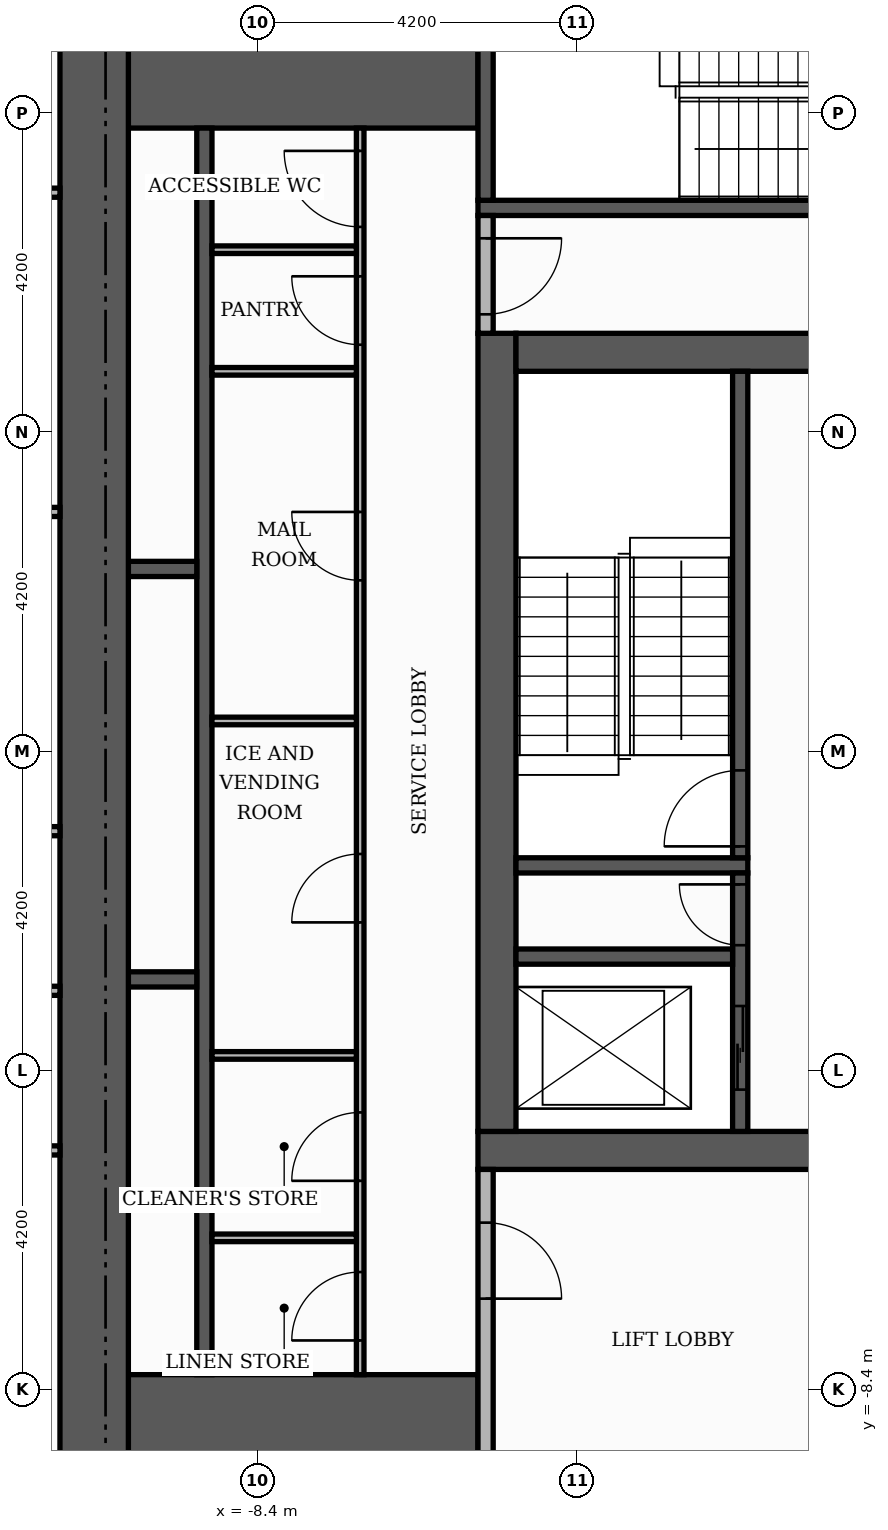
"""IFC4 building model, lengths in metres.
Left out: names, types, materials, properties, quantities, classifications, styles, units other than length and angle.
Written with IfcOpenShell. Run it as: python <this file> out.ifc"""

import sys

from ifc_helpers import new_model, si_unit, direction, frame, frame_2d, origin, place, context, subcontext, project, spatial, rectangle, extrude, element, fill, save


model = new_model("IFC4")
c1 = context("Model", 3, precision=1e-05, world=origin(), true_north=direction((0.0, 1.0)))
c2 = subcontext(c1, "Body", "Model", "MODEL_VIEW")
j1 = project(units=[si_unit("LENGTHUNIT", "METRE"), si_unit("PLANEANGLEUNIT", "RADIAN")], contexts=[c1])
p1 = place(None, origin())
s1 = spatial("IfcSite", under=j1, at=p1, CompositionType="ELEMENT")
p2 = place(p1, origin())
s2 = spatial("IfcBuilding", under=s1, at=p2, CompositionType="ELEMENT")
p3 = place(p2, frame((0.0, 0.0, 275.7)))
s3 = spatial("IfcBuildingStorey", under=s2, at=p3, CompositionType="ELEMENT", Elevation=275.7)
p4 = place(p3, frame((-5.5, -5.25, 0.0), z_axis=(0.0, 0.0, 1.0), x_axis=(1.0, 0.0, 0.0)))
e1 = element("IfcWall", 1, at=p4, inside=s3, PredefinedType="SHEAR", context=c2, shape_type="SweptSolid", body=[
    extrude(rectangle(XDim=11.0, YDim=0.5, at=frame_2d((5.5, 0.0))), origin(), (0.0, 0.0, 1.0), 3.48),
])
p5 = place(p4, frame((4.9, 0.0, 0.0)))
e2 = element("IfcOpeningElement", 2, at=p5, cuts=e1, PredefinedType="OPENING", context=c2, shape_type="SweptSolid", body=[
    extrude(rectangle(XDim=1.2, YDim=2.1, at=frame_2d((0.6, 1.05))), frame((0.0, 0.26, 0.0), z_axis=(0.0, -1.0, 0.0), x_axis=(1.0, 0.0, 0.0)), (0.0, 0.0, 1.0), 0.52),
])
p6 = place(p3, frame((-5.25, -5.0, 0.0), z_axis=(0.0, 0.0, 1.0), x_axis=(0.0, 1.0, 0.0)))
e3 = element("IfcWall", 3, at=p6, inside=s3, PredefinedType="SHEAR", context=c2, shape_type="SweptSolid", body=[
    extrude(rectangle(XDim=10.5, YDim=0.5, at=frame_2d((5.25, 0.0))), origin(), (0.0, 0.0, 1.0), 3.48),
])
p7 = place(p3, frame((-5.0, 5.25, 0.0), z_axis=(0.0, 0.0, 1.0), x_axis=(1.0, 0.0, 0.0)))
e4 = element("IfcWall", 4, at=p7, inside=s3, PredefinedType="SHEAR", context=c2, shape_type="SweptSolid", body=[
    extrude(rectangle(XDim=10.0, YDim=0.5, at=frame_2d((5.0, 0.0))), origin(), (0.0, 0.0, 1.0), 3.48),
])
p8 = place(p7, frame((4.4, 0.0, 0.0)))
e5 = element("IfcOpeningElement", 5, at=p8, cuts=e4, PredefinedType="OPENING", context=c2, shape_type="SweptSolid", body=[
    extrude(rectangle(XDim=1.2, YDim=2.1, at=frame_2d((0.6, 1.05))), frame((0.0, 0.26, 0.0), z_axis=(0.0, -1.0, 0.0), x_axis=(1.0, 0.0, 0.0)), (0.0, 0.0, 1.0), 0.52),
])
for number, where, z_axis, x_axis in (
    (6, (-10.1, -9.15, 0.0), (0.0, 0.0, 1.0), (1.0, 0.0, 0.0)),
    (7, (-10.1, 9.15, 0.0), (0.0, 0.0, 1.0), (1.0, 0.0, 0.0)),
):
    element("IfcWall", number, at=place(p3, frame(where, z_axis=z_axis, x_axis=x_axis)), inside=s3, PredefinedType="SHEAR", context=c2, shape_type="SweptSolid", body=[
        extrude(rectangle(XDim=4.6, YDim=1.9, at=frame_2d((2.3, 0.0))), origin(), (0.0, 0.0, 1.0), 3.48),
    ])
p9 = place(p3, frame((-5.0, -1.5, 0.0), z_axis=(0.0, 0.0, 1.0), x_axis=(1.0, 0.0, 0.0)))
e8 = element("IfcWall", 8, at=p9, inside=s3, PredefinedType="SHEAR", context=c2, shape_type="SweptSolid", body=[
    extrude(rectangle(XDim=3.05, YDim=0.2, at=frame_2d((1.525, 0.0))), origin(), (0.0, 0.0, 1.0), 3.48),
])
p10 = place(p3, frame((-2.05, -1.4, 0.0), z_axis=(0.0, 0.0, 1.0), x_axis=(0.0, 1.0, 0.0)))
e9 = element("IfcWall", 9, at=p10, inside=s3, PredefinedType="SHEAR", context=c2, shape_type="SweptSolid", body=[
    extrude(rectangle(XDim=6.4, YDim=0.2, at=frame_2d((3.2, 0.0))), origin(), (0.0, 0.0, 1.0), 3.48),
])
p11 = place(p10, frame((0.15, 0.0, 0.0)))
e10 = element("IfcOpeningElement", 10, at=p11, cuts=e9, PredefinedType="OPENING", context=c2, shape_type="SweptSolid", body=[
    extrude(rectangle(XDim=1.0, YDim=2.1, at=frame_2d((0.5, 1.05))), frame((0.0, 0.11, 0.0), z_axis=(0.0, -1.0, 0.0), x_axis=(1.0, 0.0, 0.0)), (0.0, 0.0, 1.0), 0.22),
])
p12 = place(p3, frame((-5.5, 7.15, 0.0), z_axis=(0.0, 0.0, 1.0), x_axis=(1.0, 0.0, 0.0)))
e11 = element("IfcWall", 11, at=p12, inside=s3, PredefinedType="SHEAR", context=c2, shape_type="SweptSolid", body=[
    extrude(rectangle(XDim=6.8, YDim=0.2, at=frame_2d((3.4, 0.0))), origin(), (0.0, 0.0, 1.0), 3.48),
])
p13 = place(p3, frame((-5.4, 7.25, 0.0), z_axis=(0.0, 0.0, 1.0), x_axis=(0.0, 1.0, 0.0)))
e12 = element("IfcWall", 12, at=p13, inside=s3, PredefinedType="SHEAR", context=c2, shape_type="SweptSolid", body=[
    extrude(rectangle(XDim=2.85, YDim=0.2, at=frame_2d((1.425, 0.0))), origin(), (0.0, 0.0, 1.0), 3.48),
])
p14 = place(p3, frame((-9.1, -8.2, 0.0), z_axis=(0.0, 0.0, 1.0), x_axis=(0.0, 1.0, 0.0)))
e13 = element("IfcWall", 13, at=p14, inside=s3, PredefinedType="SHEAR", context=c2, shape_type="SweptSolid", body=[
    extrude(rectangle(XDim=16.4, YDim=0.2, at=frame_2d((8.2, 0.0))), origin(), (0.0, 0.0, 1.0), 3.48),
])
p15 = place(p3, frame((-2.05, -5.0, 0.0), z_axis=(0.0, 0.0, 1.0), x_axis=(0.0, 1.0, 0.0)))
e14 = element("IfcWall", 14, at=p15, inside=s3, PredefinedType="SHEAR", context=c2, shape_type="SweptSolid", body=[
    extrude(rectangle(XDim=3.4, YDim=0.2, at=frame_2d((1.7, 0.0))), origin(), (0.0, 0.0, 1.0), 3.48),
])
p16 = place(p15, frame((0.55, 0.0, 0.0)))
e15 = element("IfcOpeningElement", 15, at=p16, cuts=e14, PredefinedType="OPENING", context=c2, shape_type="SweptSolid", body=[
    extrude(rectangle(XDim=1.1, YDim=2.1, at=frame_2d((0.55, 1.05))), frame((0.0, 0.11, 0.0), z_axis=(0.0, -1.0, 0.0), x_axis=(1.0, 0.0, 0.0)), (0.0, 0.0, 1.0), 0.22),
])
p17 = place(p15, frame((2.45, 0.0, 0.0)))
e16 = element("IfcOpeningElement", 16, at=p17, cuts=e14, PredefinedType="OPENING", context=c2, shape_type="SweptSolid", body=[
    extrude(rectangle(XDim=0.8, YDim=2.1, at=frame_2d((0.4, 1.05))), frame((0.0, 0.11, 0.0), z_axis=(0.0, -1.0, 0.0), x_axis=(1.0, 0.0, 0.0)), (0.0, 0.0, 1.0), 0.22),
])
p18 = place(p3, frame((-10.1, -3.0, 0.0), z_axis=(0.0, 0.0, 1.0), x_axis=(1.0, 0.0, 0.0)))
e17 = element("IfcWall", 17, at=p18, inside=s3, PredefinedType="SHEAR", context=c2, shape_type="SweptSolid", body=[
    extrude(rectangle(XDim=0.9, YDim=0.2, at=frame_2d((0.45, 0.0))), origin(), (0.0, 0.0, 1.0), 3.48),
])
p19 = place(p3, frame((-5.0, -2.7, 0.0), z_axis=(0.0, 0.0, 1.0), x_axis=(1.0, 0.0, 0.0)))
e18 = element("IfcWall", 18, at=p19, inside=s3, PredefinedType="SHEAR", context=c2, shape_type="SweptSolid", body=[
    extrude(rectangle(XDim=2.85, YDim=0.2, at=frame_2d((1.425, 0.0))), origin(), (0.0, 0.0, 1.0), 3.48),
])
p20 = place(p3, frame((-10.1, 2.4, 0.0), z_axis=(0.0, 0.0, 1.0), x_axis=(1.0, 0.0, 0.0)))
e19 = element("IfcWall", 19, at=p20, inside=s3, PredefinedType="SHEAR", context=c2, shape_type="SweptSolid", body=[
    extrude(rectangle(XDim=0.9, YDim=0.2, at=frame_2d((0.45, 0.0))), origin(), (0.0, 0.0, 1.0), 3.48),
])
p21 = place(p3, frame((-10.55, -10.1, 0.0), z_axis=(0.0, 0.0, 1.0), x_axis=(0.0, 1.0, 0.0)))
e20 = element("IfcWall", 20, at=p21, inside=s3, PredefinedType="SHEAR", context=c2, shape_type="SweptSolid", body=[
    extrude(rectangle(XDim=20.2, YDim=0.9, at=frame_2d((10.1, 0.0))), origin(), (0.0, 0.0, 1.0), 3.48),
])
p22 = place(p3, frame((-5.4, -10.1, 0.0), z_axis=(0.0, 0.0, 1.0), x_axis=(0.0, 1.0, 0.0)))
e21 = element("IfcWall", 21, at=p22, inside=s3, PredefinedType="PARTITIONING", context=c2, shape_type="SweptSolid", body=[
    extrude(rectangle(XDim=4.6, YDim=0.2, at=frame_2d((2.3, 0.0))), origin(), (0.0, 0.0, 1.0), 3.48),
])
p23 = place(p22, frame((2.9, 0.0, 0.0)))
e22 = element("IfcOpeningElement", 22, at=p23, cuts=e21, PredefinedType="OPENING", context=c2, shape_type="SweptSolid", body=[
    extrude(rectangle(XDim=1.0, YDim=2.1, at=frame_2d((0.5, 1.05))), frame((0.0, 0.11, 0.0), z_axis=(0.0, -1.0, 0.0), x_axis=(1.0, 0.0, 0.0)), (0.0, 0.0, 1.0), 0.22),
])
p24 = place(p3, frame((-7.05, -8.2, 0.0), z_axis=(0.0, 0.0, 1.0), x_axis=(0.0, 1.0, 0.0)))
e23 = element("IfcWall", 23, at=p24, inside=s3, PredefinedType="PARTITIONING", context=c2, shape_type="SweptSolid", body=[
    extrude(rectangle(XDim=16.4, YDim=0.1, at=frame_2d((8.2, 0.0))), origin(), (0.0, 0.0, 1.0), 3.48),
])
p25 = place(p24, frame((0.45, 0.0, 0.0)))
e24 = element("IfcOpeningElement", 24, at=p25, cuts=e23, PredefinedType="OPENING", context=c2, shape_type="SweptSolid", body=[
    extrude(rectangle(XDim=0.9, YDim=2.1, at=frame_2d((0.45, 1.05))), frame((0.0, 0.06, 0.0), z_axis=(0.0, -1.0, 0.0), x_axis=(1.0, 0.0, 0.0)), (0.0, 0.0, 1.0), 0.12),
])
p26 = place(p24, frame((2.55, 0.0, 0.0)))
e25 = element("IfcOpeningElement", 25, at=p26, cuts=e23, PredefinedType="OPENING", context=c2, shape_type="SweptSolid", body=[
    extrude(rectangle(XDim=0.9, YDim=2.1, at=frame_2d((0.45, 1.05))), frame((0.0, 0.06, 0.0), z_axis=(0.0, -1.0, 0.0), x_axis=(1.0, 0.0, 0.0)), (0.0, 0.0, 1.0), 0.12),
])
p27 = place(p24, frame((5.95, 0.0, 0.0)))
e26 = element("IfcOpeningElement", 26, at=p27, cuts=e23, PredefinedType="OPENING", context=c2, shape_type="SweptSolid", body=[
    extrude(rectangle(XDim=0.9, YDim=2.1, at=frame_2d((0.45, 1.05))), frame((0.0, 0.06, 0.0), z_axis=(0.0, -1.0, 0.0), x_axis=(1.0, 0.0, 0.0)), (0.0, 0.0, 1.0), 0.12),
])
p28 = place(p24, frame((10.45, 0.0, 0.0)))
e27 = element("IfcOpeningElement", 27, at=p28, cuts=e23, PredefinedType="OPENING", context=c2, shape_type="SweptSolid", body=[
    extrude(rectangle(XDim=0.9, YDim=2.1, at=frame_2d((0.45, 1.05))), frame((0.0, 0.06, 0.0), z_axis=(0.0, -1.0, 0.0), x_axis=(1.0, 0.0, 0.0)), (0.0, 0.0, 1.0), 0.12),
])
p29 = place(p24, frame((13.55, 0.0, 0.0)))
e28 = element("IfcOpeningElement", 28, at=p29, cuts=e23, PredefinedType="OPENING", context=c2, shape_type="SweptSolid", body=[
    extrude(rectangle(XDim=0.9, YDim=2.1, at=frame_2d((0.45, 1.05))), frame((0.0, 0.06, 0.0), z_axis=(0.0, -1.0, 0.0), x_axis=(1.0, 0.0, 0.0)), (0.0, 0.0, 1.0), 0.12),
])
p30 = place(p24, frame((15.1, 0.0, 0.0)))
e29 = element("IfcOpeningElement", 29, at=p30, cuts=e23, PredefinedType="OPENING", context=c2, shape_type="SweptSolid", body=[
    extrude(rectangle(XDim=1.0, YDim=2.1, at=frame_2d((0.5, 1.05))), frame((0.0, 0.06, 0.0), z_axis=(0.0, -1.0, 0.0), x_axis=(1.0, 0.0, 0.0)), (0.0, 0.0, 1.0), 0.12),
])
for number, where, z_axis, x_axis in (
    (30, (-9.0, -6.4, 0.0), (0.0, 0.0, 1.0), (1.0, 0.0, 0.0)),
    (31, (-9.0, -4.0, 0.0), (0.0, 0.0, 1.0), (1.0, 0.0, 0.0)),
    (32, (-9.0, 0.4, 0.0), (0.0, 0.0, 1.0), (1.0, 0.0, 0.0)),
    (33, (-9.0, 5.0, 0.0), (0.0, 0.0, 1.0), (1.0, 0.0, 0.0)),
):
    element("IfcWall", number, at=place(p3, frame(where, z_axis=z_axis, x_axis=x_axis)), inside=s3, PredefinedType="PARTITIONING", context=c2, shape_type="SweptSolid", body=[
        extrude(rectangle(XDim=1.9, YDim=0.1, at=frame_2d((0.95, 0.0))), origin(), (0.0, 0.0, 1.0), 3.48),
    ])
p31 = place(p3, frame((-5.4, 5.5, 0.0), z_axis=(0.0, 0.0, 1.0), x_axis=(0.0, 1.0, 0.0)))
e34 = element("IfcWall", 34, at=p31, inside=s3, PredefinedType="PARTITIONING", context=c2, shape_type="SweptSolid", body=[
    extrude(rectangle(XDim=1.55, YDim=0.2, at=frame_2d((0.775, 0.0))), origin(), (0.0, 0.0, 1.0), 3.48),
])
p32 = place(p31, frame((0.25, 0.0, 0.0)))
e35 = element("IfcOpeningElement", 35, at=p32, cuts=e34, PredefinedType="OPENING", context=c2, shape_type="SweptSolid", body=[
    extrude(rectangle(XDim=1.0, YDim=2.1, at=frame_2d((0.5, 1.05))), frame((0.0, 0.11, 0.0), z_axis=(0.0, -1.0, 0.0), x_axis=(1.0, 0.0, 0.0)), (0.0, 0.0, 1.0), 0.22),
])
p33 = place(p3, frame((-9.0, 6.6, 0.0), z_axis=(0.0, 0.0, 1.0), x_axis=(1.0, 0.0, 0.0)))
e36 = element("IfcWall", 36, at=p33, inside=s3, PredefinedType="PARTITIONING", context=c2, shape_type="SweptSolid", body=[
    extrude(rectangle(XDim=1.9, YDim=0.1, at=frame_2d((0.95, 0.0))), origin(), (0.0, 0.0, 1.0), 3.48),
])
for number, where, z_axis, x_axis in (
    (37, (-19.22, -5.25, 0.0), (0.0, 0.0, 1.0), (1.0, 0.0, 0.0)),
    (38, (-19.22, -3.15, 0.0), (0.0, 0.0, 1.0), (1.0, 0.0, 0.0)),
    (39, (-19.22, -1.05, 0.0), (0.0, 0.0, 1.0), (1.0, 0.0, 0.0)),
    (40, (-19.22, 3.15, 0.0), (0.0, 0.0, 1.0), (1.0, 0.0, 0.0)),
):
    element("IfcWall", number, at=place(p3, frame(where, z_axis=z_axis, x_axis=x_axis)), inside=s3, PredefinedType="PARTITIONING", context=c2, shape_type="SweptSolid", body=[
        extrude(rectangle(XDim=8.22, YDim=0.12, at=frame_2d((4.11, 0.0))), origin(), (0.0, 0.0, 1.0), 3.48),
    ])
p34 = place(p3, frame((-19.22, 7.35, 0.0), z_axis=(0.0, 0.0, 1.0), x_axis=(1.0, 0.0, 0.0)))
e41 = element("IfcWall", 41, at=p34, inside=s3, PredefinedType="PARTITIONING", context=c2, shape_type="SweptSolid", body=[
    extrude(rectangle(XDim=8.22, YDim=0.12, at=frame_2d((4.11, 0.0))), origin(), (0.0, 0.0, 1.0), 3.48),
])
p35 = place(p34, frame((3.66, 0.0, 0.0)))
e42 = element("IfcOpeningElement", 42, at=p35, cuts=e41, PredefinedType="OPENING", context=c2, shape_type="SweptSolid", body=[
    extrude(rectangle(XDim=0.9, YDim=2.1, at=frame_2d((0.45, 1.05))), frame((0.0, 0.07, 0.0), z_axis=(0.0, -1.0, 0.0), x_axis=(1.0, 0.0, 0.0)), (0.0, 0.0, 1.0), 0.14),
])
p36 = place(p16, origin())
e43 = element("IfcDoor", 43, at=p36, inside=s3, OperationType="SLIDING_TO_LEFT", PredefinedType="DOOR", context=c2, shape_type="SweptSolid", body=[
    extrude(rectangle(XDim=1.1, YDim=2.1, at=frame_2d((0.55, 1.05))), frame((0.0, 0.025, 0.0), z_axis=(0.0, -1.0, 0.0), x_axis=(1.0, 0.0, 0.0)), (0.0, 0.0, 1.0), 0.05),
])
fill(e15, e43)
p37 = place(p11, origin())
e44 = element("IfcDoor", 44, at=p37, inside=s3, OperationType="SINGLE_SWING_LEFT", PredefinedType="DOOR", context=c2, shape_type="SweptSolid", body=[
    extrude(rectangle(XDim=1.0, YDim=2.1, at=frame_2d((0.5, 1.05))), frame((0.0, 0.025, 0.0), z_axis=(0.0, -1.0, 0.0), x_axis=(1.0, 0.0, 0.0)), (0.0, 0.0, 1.0), 0.05),
])
fill(e10, e44)
p38 = place(p17, origin())
e45 = element("IfcDoor", 45, at=p38, inside=s3, OperationType="SINGLE_SWING_RIGHT", PredefinedType="DOOR", context=c2, shape_type="SweptSolid", body=[
    extrude(rectangle(XDim=0.8, YDim=2.1, at=frame_2d((0.4, 1.05))), frame((0.0, 0.025, 0.0), z_axis=(0.0, -1.0, 0.0), x_axis=(1.0, 0.0, 0.0)), (0.0, 0.0, 1.0), 0.05),
])
fill(e16, e45)
p39 = place(p32, frame((1.0, 0.0, 0.0), z_axis=(0.0, 0.0, 1.0), x_axis=(-1.0, 0.0, 0.0)))
e46 = element("IfcDoor", 46, at=p39, inside=s3, OperationType="SINGLE_SWING_RIGHT", PredefinedType="DOOR", context=c2, shape_type="SweptSolid", body=[
    extrude(rectangle(XDim=1.0, YDim=2.1, at=frame_2d((0.5, 1.05))), frame((0.0, 0.025, 0.0), z_axis=(0.0, -1.0, 0.0), x_axis=(1.0, 0.0, 0.0)), (0.0, 0.0, 1.0), 0.05),
])
fill(e35, e46)
p40 = place(p23, frame((1.0, 0.0, 0.0), z_axis=(0.0, 0.0, 1.0), x_axis=(-1.0, 0.0, 0.0)))
e47 = element("IfcDoor", 47, at=p40, inside=s3, OperationType="SINGLE_SWING_LEFT", PredefinedType="DOOR", context=c2, shape_type="SweptSolid", body=[
    extrude(rectangle(XDim=1.0, YDim=2.1, at=frame_2d((0.5, 1.05))), frame((0.0, 0.025, 0.0), z_axis=(0.0, -1.0, 0.0), x_axis=(1.0, 0.0, 0.0)), (0.0, 0.0, 1.0), 0.05),
])
fill(e22, e47)
p41 = place(p25, origin())
e48 = element("IfcDoor", 48, at=p41, inside=s3, OperationType="SINGLE_SWING_LEFT", PredefinedType="DOOR", context=c2, shape_type="SweptSolid", body=[
    extrude(rectangle(XDim=0.9, YDim=2.1, at=frame_2d((0.45, 1.05))), frame((0.0, 0.025, 0.0), z_axis=(0.0, -1.0, 0.0), x_axis=(1.0, 0.0, 0.0)), (0.0, 0.0, 1.0), 0.05),
])
fill(e24, e48)
p42 = place(p26, origin())
e49 = element("IfcDoor", 49, at=p42, inside=s3, OperationType="SINGLE_SWING_LEFT", PredefinedType="DOOR", context=c2, shape_type="SweptSolid", body=[
    extrude(rectangle(XDim=0.9, YDim=2.1, at=frame_2d((0.45, 1.05))), frame((0.0, 0.025, 0.0), z_axis=(0.0, -1.0, 0.0), x_axis=(1.0, 0.0, 0.0)), (0.0, 0.0, 1.0), 0.05),
])
fill(e25, e49)
p43 = place(p27, origin())
e50 = element("IfcDoor", 50, at=p43, inside=s3, OperationType="SINGLE_SWING_LEFT", PredefinedType="DOOR", context=c2, shape_type="SweptSolid", body=[
    extrude(rectangle(XDim=0.9, YDim=2.1, at=frame_2d((0.45, 1.05))), frame((0.0, 0.025, 0.0), z_axis=(0.0, -1.0, 0.0), x_axis=(1.0, 0.0, 0.0)), (0.0, 0.0, 1.0), 0.05),
])
fill(e26, e50)
p44 = place(p28, origin())
e51 = element("IfcDoor", 51, at=p44, inside=s3, OperationType="SINGLE_SWING_RIGHT", PredefinedType="DOOR", context=c2, shape_type="SweptSolid", body=[
    extrude(rectangle(XDim=0.9, YDim=2.1, at=frame_2d((0.45, 1.05))), frame((0.0, 0.025, 0.0), z_axis=(0.0, -1.0, 0.0), x_axis=(1.0, 0.0, 0.0)), (0.0, 0.0, 1.0), 0.05),
])
fill(e27, e51)
p45 = place(p29, origin())
e52 = element("IfcDoor", 52, at=p45, inside=s3, OperationType="SINGLE_SWING_RIGHT", PredefinedType="DOOR", context=c2, shape_type="SweptSolid", body=[
    extrude(rectangle(XDim=0.9, YDim=2.1, at=frame_2d((0.45, 1.05))), frame((0.0, 0.025, 0.0), z_axis=(0.0, -1.0, 0.0), x_axis=(1.0, 0.0, 0.0)), (0.0, 0.0, 1.0), 0.05),
])
fill(e28, e52)
p46 = place(p30, origin())
e53 = element("IfcDoor", 53, at=p46, inside=s3, OperationType="SINGLE_SWING_RIGHT", PredefinedType="DOOR", context=c2, shape_type="SweptSolid", body=[
    extrude(rectangle(XDim=1.0, YDim=2.1, at=frame_2d((0.5, 1.05))), frame((0.0, 0.025, 0.0), z_axis=(0.0, -1.0, 0.0), x_axis=(1.0, 0.0, 0.0)), (0.0, 0.0, 1.0), 0.05),
])
fill(e29, e53)
save(model, sys.argv[1])
